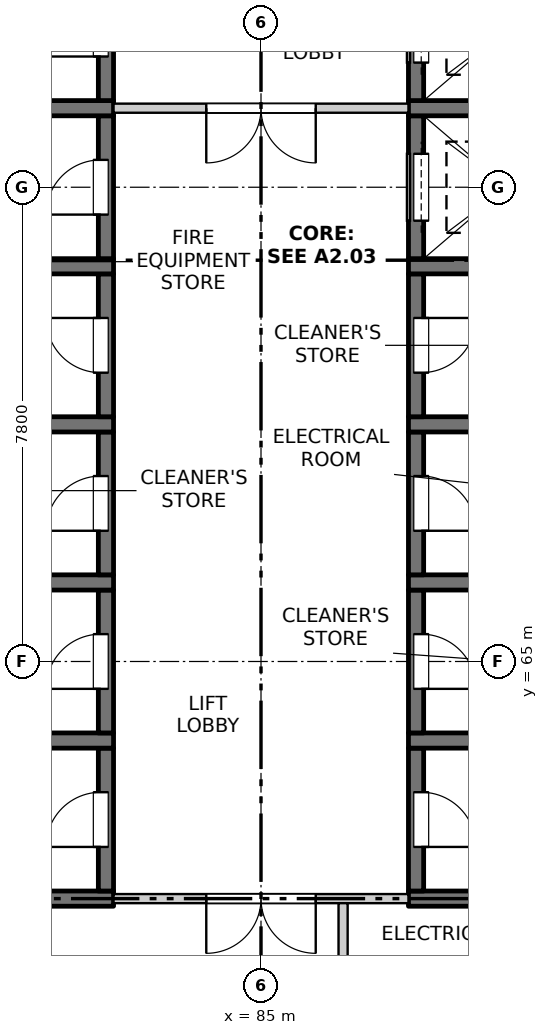
"""IFC4 building model, lengths in metres.
Left out: names, types, materials, properties, quantities, classifications, styles, units other than length and angle.
Written with IfcOpenShell. Run it as: python <this file> out.ifc"""

import sys

from ifc_helpers import new_model, si_unit, direction, frame, frame_2d, origin, place, context, subcontext, project, spatial, rectangle, extrude, element, fill, save


model = new_model("IFC4")
c1 = context("Model", 3, precision=1e-05, world=origin(), true_north=direction((0.0, 1.0)))
c2 = subcontext(c1, "Body", "Model", "MODEL_VIEW")
j1 = project(units=[si_unit("LENGTHUNIT", "METRE"), si_unit("PLANEANGLEUNIT", "RADIAN")], contexts=[c1])
p1 = place(None, origin())
s1 = spatial("IfcSite", under=j1, at=p1, CompositionType="ELEMENT")
p2 = place(p1, origin())
s2 = spatial("IfcBuilding", under=s1, at=p2, CompositionType="ELEMENT")
p3 = place(p2, frame((0.0, 0.0, 204.1)))
s3 = spatial("IfcBuildingStorey", under=s2, at=p3, CompositionType="ELEMENT", Elevation=204.1)
p4 = place(p3, frame((79.575, 61.1, -0.25), z_axis=(0.0, 0.0, 1.0), x_axis=(1.0, 0.0, 0.0)))
e1 = element("IfcWall", 1, at=p4, inside=s3, PredefinedType="SOLIDWALL", context=c2, shape_type="SweptSolid", body=[
    extrude(rectangle(XDim=3.0, YDim=0.25, at=frame_2d((1.5, 0.0))), origin(), (0.0, 0.0, 1.0), 3.4),
])
p5 = place(p3, frame((82.45, 61.225, -0.25), z_axis=(0.0, 0.0, 1.0), x_axis=(0.0, 1.0, 0.0)))
e2 = element("IfcWall", 2, at=p5, inside=s3, PredefinedType="SOLIDWALL", context=c2, shape_type="SweptSolid", body=[
    extrude(rectangle(XDim=2.35, YDim=0.25, at=frame_2d((1.175, 0.0))), origin(), (0.0, 0.0, 1.0), 3.4),
])
p6 = place(p5, frame((0.725, 0.0, 0.25)))
e3 = element("IfcOpeningElement", 3, at=p6, cuts=e2, PredefinedType="OPENING", context=c2, shape_type="SweptSolid", body=[
    extrude(rectangle(XDim=0.9, YDim=2.1, at=frame_2d((0.45, 1.05))), frame((0.0, 0.135, 0.0), z_axis=(0.0, -1.0, 0.0), x_axis=(1.0, 0.0, 0.0)), (0.0, 0.0, 1.0), 0.27),
])
p7 = place(p3, frame((79.575, 63.7, -0.25), z_axis=(0.0, 0.0, 1.0), x_axis=(1.0, 0.0, 0.0)))
e4 = element("IfcWall", 4, at=p7, inside=s3, PredefinedType="SOLIDWALL", context=c2, shape_type="SweptSolid", body=[
    extrude(rectangle(XDim=3.0, YDim=0.25, at=frame_2d((1.5, 0.0))), origin(), (0.0, 0.0, 1.0), 3.4),
])
p8 = place(p3, frame((82.45, 63.825, -0.25), z_axis=(0.0, 0.0, 1.0), x_axis=(0.0, 1.0, 0.0)))
e5 = element("IfcWall", 5, at=p8, inside=s3, PredefinedType="SOLIDWALL", context=c2, shape_type="SweptSolid", body=[
    extrude(rectangle(XDim=2.35, YDim=0.25, at=frame_2d((1.175, 0.0))), origin(), (0.0, 0.0, 1.0), 3.4),
])
p9 = place(p8, frame((0.725, 0.0, 0.25)))
e6 = element("IfcOpeningElement", 6, at=p9, cuts=e5, PredefinedType="OPENING", context=c2, shape_type="SweptSolid", body=[
    extrude(rectangle(XDim=0.9, YDim=2.1, at=frame_2d((0.45, 1.05))), frame((0.0, 0.135, 0.0), z_axis=(0.0, -1.0, 0.0), x_axis=(1.0, 0.0, 0.0)), (0.0, 0.0, 1.0), 0.27),
])
p10 = place(p3, frame((79.575, 66.3, -0.25), z_axis=(0.0, 0.0, 1.0), x_axis=(1.0, 0.0, 0.0)))
e7 = element("IfcWall", 7, at=p10, inside=s3, PredefinedType="SOLIDWALL", context=c2, shape_type="SweptSolid", body=[
    extrude(rectangle(XDim=3.0, YDim=0.25, at=frame_2d((1.5, 0.0))), origin(), (0.0, 0.0, 1.0), 3.4),
])
p11 = place(p3, frame((82.45, 66.425, -0.25), z_axis=(0.0, 0.0, 1.0), x_axis=(0.0, 1.0, 0.0)))
e8 = element("IfcWall", 8, at=p11, inside=s3, PredefinedType="SOLIDWALL", context=c2, shape_type="SweptSolid", body=[
    extrude(rectangle(XDim=2.35, YDim=0.25, at=frame_2d((1.175, 0.0))), origin(), (0.0, 0.0, 1.0), 3.4),
])
p12 = place(p11, frame((0.725, 0.0, 0.25)))
e9 = element("IfcOpeningElement", 9, at=p12, cuts=e8, PredefinedType="OPENING", context=c2, shape_type="SweptSolid", body=[
    extrude(rectangle(XDim=0.9, YDim=2.1, at=frame_2d((0.45, 1.05))), frame((0.0, 0.135, 0.0), z_axis=(0.0, -1.0, 0.0), x_axis=(1.0, 0.0, 0.0)), (0.0, 0.0, 1.0), 0.27),
])
p13 = place(p3, frame((79.575, 68.9, -0.25), z_axis=(0.0, 0.0, 1.0), x_axis=(1.0, 0.0, 0.0)))
e10 = element("IfcWall", 10, at=p13, inside=s3, PredefinedType="SOLIDWALL", context=c2, shape_type="SweptSolid", body=[
    extrude(rectangle(XDim=3.0, YDim=0.25, at=frame_2d((1.5, 0.0))), origin(), (0.0, 0.0, 1.0), 3.4),
])
p14 = place(p3, frame((82.45, 69.025, -0.25), z_axis=(0.0, 0.0, 1.0), x_axis=(0.0, 1.0, 0.0)))
e11 = element("IfcWall", 11, at=p14, inside=s3, PredefinedType="SOLIDWALL", context=c2, shape_type="SweptSolid", body=[
    extrude(rectangle(XDim=2.35, YDim=0.25, at=frame_2d((1.175, 0.0))), origin(), (0.0, 0.0, 1.0), 3.4),
])
p15 = place(p14, frame((0.725, 0.0, 0.25)))
e12 = element("IfcOpeningElement", 12, at=p15, cuts=e11, PredefinedType="OPENING", context=c2, shape_type="SweptSolid", body=[
    extrude(rectangle(XDim=0.9, YDim=2.1, at=frame_2d((0.45, 1.05))), frame((0.0, 0.135, 0.0), z_axis=(0.0, -1.0, 0.0), x_axis=(1.0, 0.0, 0.0)), (0.0, 0.0, 1.0), 0.27),
])
p16 = place(p3, frame((79.575, 71.5, -0.25), z_axis=(0.0, 0.0, 1.0), x_axis=(1.0, 0.0, 0.0)))
e13 = element("IfcWall", 13, at=p16, inside=s3, PredefinedType="SOLIDWALL", context=c2, shape_type="SweptSolid", body=[
    extrude(rectangle(XDim=3.0, YDim=0.25, at=frame_2d((1.5, 0.0))), origin(), (0.0, 0.0, 1.0), 3.4),
])
p17 = place(p3, frame((82.45, 71.625, -0.25), z_axis=(0.0, 0.0, 1.0), x_axis=(0.0, 1.0, 0.0)))
e14 = element("IfcWall", 14, at=p17, inside=s3, PredefinedType="SOLIDWALL", context=c2, shape_type="SweptSolid", body=[
    extrude(rectangle(XDim=2.35, YDim=0.25, at=frame_2d((1.175, 0.0))), origin(), (0.0, 0.0, 1.0), 3.4),
])
p18 = place(p17, frame((0.725, 0.0, 0.25)))
e15 = element("IfcOpeningElement", 15, at=p18, cuts=e14, PredefinedType="OPENING", context=c2, shape_type="SweptSolid", body=[
    extrude(rectangle(XDim=0.9, YDim=2.1, at=frame_2d((0.45, 1.05))), frame((0.0, 0.135, 0.0), z_axis=(0.0, -1.0, 0.0), x_axis=(1.0, 0.0, 0.0)), (0.0, 0.0, 1.0), 0.27),
])
p19 = place(p3, frame((79.575, 74.1, -0.25), z_axis=(0.0, 0.0, 1.0), x_axis=(1.0, 0.0, 0.0)))
e16 = element("IfcWall", 16, at=p19, inside=s3, PredefinedType="SOLIDWALL", context=c2, shape_type="SweptSolid", body=[
    extrude(rectangle(XDim=3.0, YDim=0.25, at=frame_2d((1.5, 0.0))), origin(), (0.0, 0.0, 1.0), 3.4),
])
p20 = place(p3, frame((82.45, 74.225, -0.25), z_axis=(0.0, 0.0, 1.0), x_axis=(0.0, 1.0, 0.0)))
e17 = element("IfcWall", 17, at=p20, inside=s3, PredefinedType="SOLIDWALL", context=c2, shape_type="SweptSolid", body=[
    extrude(rectangle(XDim=2.35, YDim=0.25, at=frame_2d((1.175, 0.0))), origin(), (0.0, 0.0, 1.0), 3.4),
])
p21 = place(p20, frame((0.725, 0.0, 0.25)))
e18 = element("IfcOpeningElement", 18, at=p21, cuts=e17, PredefinedType="OPENING", context=c2, shape_type="SweptSolid", body=[
    extrude(rectangle(XDim=0.9, YDim=2.1, at=frame_2d((0.45, 1.05))), frame((0.0, 0.135, 0.0), z_axis=(0.0, -1.0, 0.0), x_axis=(1.0, 0.0, 0.0)), (0.0, 0.0, 1.0), 0.27),
])
p22 = place(p3, frame((87.425, 61.1, -0.25), z_axis=(0.0, 0.0, 1.0), x_axis=(1.0, 0.0, 0.0)))
e19 = element("IfcWall", 19, at=p22, inside=s3, PredefinedType="SOLIDWALL", context=c2, shape_type="SweptSolid", body=[
    extrude(rectangle(XDim=3.0, YDim=0.25, at=frame_2d((1.5, 0.0))), origin(), (0.0, 0.0, 1.0), 3.4),
])
p23 = place(p3, frame((87.55, 61.225, -0.25), z_axis=(0.0, 0.0, 1.0), x_axis=(0.0, 1.0, 0.0)))
e20 = element("IfcWall", 20, at=p23, inside=s3, PredefinedType="SOLIDWALL", context=c2, shape_type="SweptSolid", body=[
    extrude(rectangle(XDim=2.35, YDim=0.25, at=frame_2d((1.175, 0.0))), origin(), (0.0, 0.0, 1.0), 3.4),
])
p24 = place(p23, frame((0.725, 0.0, 0.25)))
e21 = element("IfcOpeningElement", 21, at=p24, cuts=e20, PredefinedType="OPENING", context=c2, shape_type="SweptSolid", body=[
    extrude(rectangle(XDim=0.9, YDim=2.1, at=frame_2d((0.45, 1.05))), frame((0.0, 0.135, 0.0), z_axis=(0.0, -1.0, 0.0), x_axis=(1.0, 0.0, 0.0)), (0.0, 0.0, 1.0), 0.27),
])
p25 = place(p3, frame((87.425, 63.7, -0.25), z_axis=(0.0, 0.0, 1.0), x_axis=(1.0, 0.0, 0.0)))
e22 = element("IfcWall", 22, at=p25, inside=s3, PredefinedType="SOLIDWALL", context=c2, shape_type="SweptSolid", body=[
    extrude(rectangle(XDim=3.0, YDim=0.25, at=frame_2d((1.5, 0.0))), origin(), (0.0, 0.0, 1.0), 3.4),
])
p26 = place(p3, frame((87.55, 63.825, -0.25), z_axis=(0.0, 0.0, 1.0), x_axis=(0.0, 1.0, 0.0)))
e23 = element("IfcWall", 23, at=p26, inside=s3, PredefinedType="SOLIDWALL", context=c2, shape_type="SweptSolid", body=[
    extrude(rectangle(XDim=2.35, YDim=0.25, at=frame_2d((1.175, 0.0))), origin(), (0.0, 0.0, 1.0), 3.4),
])
p27 = place(p26, frame((0.725, 0.0, 0.25)))
e24 = element("IfcOpeningElement", 24, at=p27, cuts=e23, PredefinedType="OPENING", context=c2, shape_type="SweptSolid", body=[
    extrude(rectangle(XDim=0.9, YDim=2.1, at=frame_2d((0.45, 1.05))), frame((0.0, 0.135, 0.0), z_axis=(0.0, -1.0, 0.0), x_axis=(1.0, 0.0, 0.0)), (0.0, 0.0, 1.0), 0.27),
])
p28 = place(p3, frame((87.425, 66.3, -0.25), z_axis=(0.0, 0.0, 1.0), x_axis=(1.0, 0.0, 0.0)))
e25 = element("IfcWall", 25, at=p28, inside=s3, PredefinedType="SOLIDWALL", context=c2, shape_type="SweptSolid", body=[
    extrude(rectangle(XDim=3.0, YDim=0.25, at=frame_2d((1.5, 0.0))), origin(), (0.0, 0.0, 1.0), 3.4),
])
p29 = place(p3, frame((87.55, 66.425, -0.25), z_axis=(0.0, 0.0, 1.0), x_axis=(0.0, 1.0, 0.0)))
e26 = element("IfcWall", 26, at=p29, inside=s3, PredefinedType="SOLIDWALL", context=c2, shape_type="SweptSolid", body=[
    extrude(rectangle(XDim=2.35, YDim=0.25, at=frame_2d((1.175, 0.0))), origin(), (0.0, 0.0, 1.0), 3.4),
])
p30 = place(p29, frame((0.725, 0.0, 0.25)))
e27 = element("IfcOpeningElement", 27, at=p30, cuts=e26, PredefinedType="OPENING", context=c2, shape_type="SweptSolid", body=[
    extrude(rectangle(XDim=0.9, YDim=2.1, at=frame_2d((0.45, 1.05))), frame((0.0, 0.135, 0.0), z_axis=(0.0, -1.0, 0.0), x_axis=(1.0, 0.0, 0.0)), (0.0, 0.0, 1.0), 0.27),
])
p31 = place(p3, frame((87.425, 68.9, -0.25), z_axis=(0.0, 0.0, 1.0), x_axis=(1.0, 0.0, 0.0)))
e28 = element("IfcWall", 28, at=p31, inside=s3, PredefinedType="SOLIDWALL", context=c2, shape_type="SweptSolid", body=[
    extrude(rectangle(XDim=3.0, YDim=0.25, at=frame_2d((1.5, 0.0))), origin(), (0.0, 0.0, 1.0), 3.4),
])
p32 = place(p3, frame((87.55, 69.025, -0.25), z_axis=(0.0, 0.0, 1.0), x_axis=(0.0, 1.0, 0.0)))
e29 = element("IfcWall", 29, at=p32, inside=s3, PredefinedType="SOLIDWALL", context=c2, shape_type="SweptSolid", body=[
    extrude(rectangle(XDim=2.35, YDim=0.25, at=frame_2d((1.175, 0.0))), origin(), (0.0, 0.0, 1.0), 3.4),
])
p33 = place(p32, frame((0.725, 0.0, 0.25)))
e30 = element("IfcOpeningElement", 30, at=p33, cuts=e29, PredefinedType="OPENING", context=c2, shape_type="SweptSolid", body=[
    extrude(rectangle(XDim=0.9, YDim=2.1, at=frame_2d((0.45, 1.05))), frame((0.0, 0.135, 0.0), z_axis=(0.0, -1.0, 0.0), x_axis=(1.0, 0.0, 0.0)), (0.0, 0.0, 1.0), 0.27),
])
p34 = place(p3, frame((87.425, 71.5, -0.25), z_axis=(0.0, 0.0, 1.0), x_axis=(1.0, 0.0, 0.0)))
e31 = element("IfcWall", 31, at=p34, inside=s3, PredefinedType="SOLIDWALL", context=c2, shape_type="SweptSolid", body=[
    extrude(rectangle(XDim=3.0, YDim=0.25, at=frame_2d((1.5, 0.0))), origin(), (0.0, 0.0, 1.0), 3.4),
])
p35 = place(p3, frame((87.55, 71.625, -0.25), z_axis=(0.0, 0.0, 1.0), x_axis=(0.0, 1.0, 0.0)))
e32 = element("IfcWall", 32, at=p35, inside=s3, PredefinedType="SOLIDWALL", context=c2, shape_type="SweptSolid", body=[
    extrude(rectangle(XDim=2.35, YDim=0.25, at=frame_2d((1.175, 0.0))), origin(), (0.0, 0.0, 1.0), 3.4),
])
p36 = place(p35, frame((0.625, 0.0, 0.25)))
e33 = element("IfcOpeningElement", 33, at=p36, cuts=e32, PredefinedType="OPENING", context=c2, shape_type="SweptSolid", body=[
    extrude(rectangle(XDim=1.1, YDim=2.1, at=frame_2d((0.55, 1.05))), frame((0.0, 0.135, 0.0), z_axis=(0.0, -1.0, 0.0), x_axis=(1.0, 0.0, 0.0)), (0.0, 0.0, 1.0), 0.27),
])
p37 = place(p3, frame((87.425, 74.1, -0.25), z_axis=(0.0, 0.0, 1.0), x_axis=(1.0, 0.0, 0.0)))
e34 = element("IfcWall", 34, at=p37, inside=s3, PredefinedType="SOLIDWALL", context=c2, shape_type="SweptSolid", body=[
    extrude(rectangle(XDim=3.0, YDim=0.25, at=frame_2d((1.5, 0.0))), origin(), (0.0, 0.0, 1.0), 3.4),
])
p38 = place(p3, frame((87.55, 74.225, -0.25), z_axis=(0.0, 0.0, 1.0), x_axis=(0.0, 1.0, 0.0)))
e35 = element("IfcWall", 35, at=p38, inside=s3, PredefinedType="SOLIDWALL", context=c2, shape_type="SweptSolid", body=[
    extrude(rectangle(XDim=2.35, YDim=0.25, at=frame_2d((1.175, 0.0))), origin(), (0.0, 0.0, 1.0), 3.4),
])
p39 = place(p38, frame((0.625, 0.0, 0.25)))
e36 = element("IfcOpeningElement", 36, at=p39, cuts=e35, PredefinedType="OPENING", context=c2, shape_type="SweptSolid", body=[
    extrude(rectangle(XDim=1.1, YDim=2.1, at=frame_2d((0.55, 1.05))), frame((0.0, 0.135, 0.0), z_axis=(0.0, -1.0, 0.0), x_axis=(1.0, 0.0, 0.0)), (0.0, 0.0, 1.0), 0.27),
])
p40 = place(p3, frame((82.575, 61.1, 0.0), z_axis=(0.0, 0.0, 1.0), x_axis=(1.0, 0.0, 0.0)))
e37 = element("IfcWall", 37, at=p40, inside=s3, PredefinedType="PARTITIONING", context=c2, shape_type="SweptSolid", body=[
    extrude(rectangle(XDim=4.85, YDim=0.15, at=frame_2d((2.425, 0.0))), origin(), (0.0, 0.0, 1.0), 3.15),
])
p41 = place(p40, frame((1.525, 0.0, 0.0)))
e38 = element("IfcOpeningElement", 38, at=p41, cuts=e37, PredefinedType="OPENING", context=c2, shape_type="SweptSolid", body=[
    extrude(rectangle(XDim=1.8, YDim=2.1, at=frame_2d((0.9, 1.05))), frame((0.0, 0.085, 0.0), z_axis=(0.0, -1.0, 0.0), x_axis=(1.0, 0.0, 0.0)), (0.0, 0.0, 1.0), 0.17),
])
p42 = place(p3, frame((82.575, 74.1, 0.0), z_axis=(0.0, 0.0, 1.0), x_axis=(1.0, 0.0, 0.0)))
e39 = element("IfcWall", 39, at=p42, inside=s3, PredefinedType="PARTITIONING", context=c2, shape_type="SweptSolid", body=[
    extrude(rectangle(XDim=4.85, YDim=0.15, at=frame_2d((2.425, 0.0))), origin(), (0.0, 0.0, 1.0), 3.15),
])
p43 = place(p42, frame((1.525, 0.0, 0.0)))
e40 = element("IfcOpeningElement", 40, at=p43, cuts=e39, PredefinedType="OPENING", context=c2, shape_type="SweptSolid", body=[
    extrude(rectangle(XDim=1.8, YDim=2.1, at=frame_2d((0.9, 1.05))), frame((0.0, 0.085, 0.0), z_axis=(0.0, -1.0, 0.0), x_axis=(1.0, 0.0, 0.0)), (0.0, 0.0, 1.0), 0.17),
])
p44 = place(p3, frame((86.35, 55.45, 0.0), z_axis=(0.0, 0.0, 1.0), x_axis=(0.0, 1.0, 0.0)))
e41 = element("IfcWall", 41, at=p44, inside=s3, PredefinedType="PARTITIONING", context=c2, shape_type="SweptSolid", body=[
    extrude(rectangle(XDim=5.575, YDim=0.15, at=frame_2d((2.788, 0.0))), origin(), (0.0, 0.0, 1.0), 3.15),
])
p45 = place(p44, frame((2.25, 0.0, 0.0)))
e42 = element("IfcOpeningElement", 42, at=p45, cuts=e41, PredefinedType="OPENING", context=c2, shape_type="SweptSolid", body=[
    extrude(rectangle(XDim=0.9, YDim=2.1, at=frame_2d((0.45, 1.05))), frame((0.0, 0.085, 0.0), z_axis=(0.0, -1.0, 0.0), x_axis=(1.0, 0.0, 0.0)), (0.0, 0.0, 1.0), 0.17),
])
p46 = place(p41, origin())
e43 = element("IfcDoor", 43, at=p46, inside=s3, OperationType="DOUBLE_DOOR_SINGLE_SWING", PredefinedType="DOOR", context=c2, shape_type="SweptSolid", body=[
    extrude(rectangle(XDim=1.8, YDim=2.1, at=frame_2d((0.9, 1.05))), frame((0.0, 0.025, 0.0), z_axis=(0.0, -1.0, 0.0), x_axis=(1.0, 0.0, 0.0)), (0.0, 0.0, 1.0), 0.05),
])
fill(e38, e43)
p47 = place(p6, origin())
e44 = element("IfcDoor", 44, at=p47, inside=s3, OperationType="SINGLE_SWING_LEFT", PredefinedType="DOOR", context=c2, shape_type="SweptSolid", body=[
    extrude(rectangle(XDim=0.9, YDim=2.1, at=frame_2d((0.45, 1.05))), frame((0.0, 0.11, 0.0), z_axis=(0.0, -1.0, 0.0), x_axis=(1.0, 0.0, 0.0)), (0.0, 0.0, 1.0), 0.05),
])
fill(e3, e44)
p48 = place(p24, origin())
e45 = element("IfcDoor", 45, at=p48, inside=s3, OperationType="SINGLE_SWING_RIGHT", PredefinedType="DOOR", context=c2, shape_type="SweptSolid", body=[
    extrude(rectangle(XDim=0.9, YDim=2.1, at=frame_2d((0.45, 1.05))), frame((0.0, -0.06, 0.0), z_axis=(0.0, -1.0, 0.0), x_axis=(1.0, 0.0, 0.0)), (0.0, 0.0, 1.0), 0.05),
])
fill(e21, e45)
p49 = place(p9, origin())
e46 = element("IfcDoor", 46, at=p49, inside=s3, OperationType="SINGLE_SWING_LEFT", PredefinedType="DOOR", context=c2, shape_type="SweptSolid", body=[
    extrude(rectangle(XDim=0.9, YDim=2.1, at=frame_2d((0.45, 1.05))), frame((0.0, 0.11, 0.0), z_axis=(0.0, -1.0, 0.0), x_axis=(1.0, 0.0, 0.0)), (0.0, 0.0, 1.0), 0.05),
])
fill(e6, e46)
p50 = place(p27, origin())
e47 = element("IfcDoor", 47, at=p50, inside=s3, OperationType="SINGLE_SWING_RIGHT", PredefinedType="DOOR", context=c2, shape_type="SweptSolid", body=[
    extrude(rectangle(XDim=0.9, YDim=2.1, at=frame_2d((0.45, 1.05))), frame((0.0, -0.06, 0.0), z_axis=(0.0, -1.0, 0.0), x_axis=(1.0, 0.0, 0.0)), (0.0, 0.0, 1.0), 0.05),
])
fill(e24, e47)
p51 = place(p12, origin())
e48 = element("IfcDoor", 48, at=p51, inside=s3, OperationType="SINGLE_SWING_LEFT", PredefinedType="DOOR", context=c2, shape_type="SweptSolid", body=[
    extrude(rectangle(XDim=0.9, YDim=2.1, at=frame_2d((0.45, 1.05))), frame((0.0, 0.11, 0.0), z_axis=(0.0, -1.0, 0.0), x_axis=(1.0, 0.0, 0.0)), (0.0, 0.0, 1.0), 0.05),
])
fill(e9, e48)
p52 = place(p30, origin())
e49 = element("IfcDoor", 49, at=p52, inside=s3, OperationType="SINGLE_SWING_RIGHT", PredefinedType="DOOR", context=c2, shape_type="SweptSolid", body=[
    extrude(rectangle(XDim=0.9, YDim=2.1, at=frame_2d((0.45, 1.05))), frame((0.0, -0.06, 0.0), z_axis=(0.0, -1.0, 0.0), x_axis=(1.0, 0.0, 0.0)), (0.0, 0.0, 1.0), 0.05),
])
fill(e27, e49)
p53 = place(p15, origin())
e50 = element("IfcDoor", 50, at=p53, inside=s3, OperationType="SINGLE_SWING_RIGHT", PredefinedType="DOOR", context=c2, shape_type="SweptSolid", body=[
    extrude(rectangle(XDim=0.9, YDim=2.1, at=frame_2d((0.45, 1.05))), frame((0.0, 0.11, 0.0), z_axis=(0.0, -1.0, 0.0), x_axis=(1.0, 0.0, 0.0)), (0.0, 0.0, 1.0), 0.05),
])
fill(e12, e50)
p54 = place(p33, origin())
e51 = element("IfcDoor", 51, at=p54, inside=s3, OperationType="SINGLE_SWING_LEFT", PredefinedType="DOOR", context=c2, shape_type="SweptSolid", body=[
    extrude(rectangle(XDim=0.9, YDim=2.1, at=frame_2d((0.45, 1.05))), frame((0.0, -0.06, 0.0), z_axis=(0.0, -1.0, 0.0), x_axis=(1.0, 0.0, 0.0)), (0.0, 0.0, 1.0), 0.05),
])
fill(e30, e51)
p55 = place(p18, origin())
e52 = element("IfcDoor", 52, at=p55, inside=s3, OperationType="SINGLE_SWING_LEFT", PredefinedType="DOOR", context=c2, shape_type="SweptSolid", body=[
    extrude(rectangle(XDim=0.9, YDim=2.1, at=frame_2d((0.45, 1.05))), frame((0.0, 0.11, 0.0), z_axis=(0.0, -1.0, 0.0), x_axis=(1.0, 0.0, 0.0)), (0.0, 0.0, 1.0), 0.05),
])
fill(e15, e52)
p56 = place(p36, origin())
e53 = element("IfcDoor", 53, at=p56, inside=s3, OperationType="SLIDING_TO_LEFT", PredefinedType="DOOR", context=c2, shape_type="SweptSolid", body=[
    extrude(rectangle(XDim=1.1, YDim=2.1, at=frame_2d((0.55, 1.05))), frame((0.0, -0.06, 0.0), z_axis=(0.0, -1.0, 0.0), x_axis=(1.0, 0.0, 0.0)), (0.0, 0.0, 1.0), 0.05),
])
fill(e33, e53)
p57 = place(p43, origin())
e54 = element("IfcDoor", 54, at=p57, inside=s3, OperationType="DOUBLE_DOOR_SINGLE_SWING", PredefinedType="DOOR", context=c2, shape_type="SweptSolid", body=[
    extrude(rectangle(XDim=1.8, YDim=2.1, at=frame_2d((0.9, 1.05))), frame((0.0, 0.025, 0.0), z_axis=(0.0, -1.0, 0.0), x_axis=(1.0, 0.0, 0.0)), (0.0, 0.0, 1.0), 0.05),
])
fill(e40, e54)
p58 = place(p21, origin())
e55 = element("IfcDoor", 55, at=p58, inside=s3, OperationType="SINGLE_SWING_LEFT", PredefinedType="DOOR", context=c2, shape_type="SweptSolid", body=[
    extrude(rectangle(XDim=0.9, YDim=2.1, at=frame_2d((0.45, 1.05))), frame((0.0, 0.11, 0.0), z_axis=(0.0, -1.0, 0.0), x_axis=(1.0, 0.0, 0.0)), (0.0, 0.0, 1.0), 0.05),
])
fill(e18, e55)
p59 = place(p39, origin())
e56 = element("IfcDoor", 56, at=p59, inside=s3, OperationType="SLIDING_TO_LEFT", PredefinedType="DOOR", context=c2, shape_type="SweptSolid", body=[
    extrude(rectangle(XDim=1.1, YDim=2.1, at=frame_2d((0.55, 1.05))), frame((0.0, -0.06, 0.0), z_axis=(0.0, -1.0, 0.0), x_axis=(1.0, 0.0, 0.0)), (0.0, 0.0, 1.0), 0.05),
])
fill(e36, e56)
save(model, sys.argv[1])
